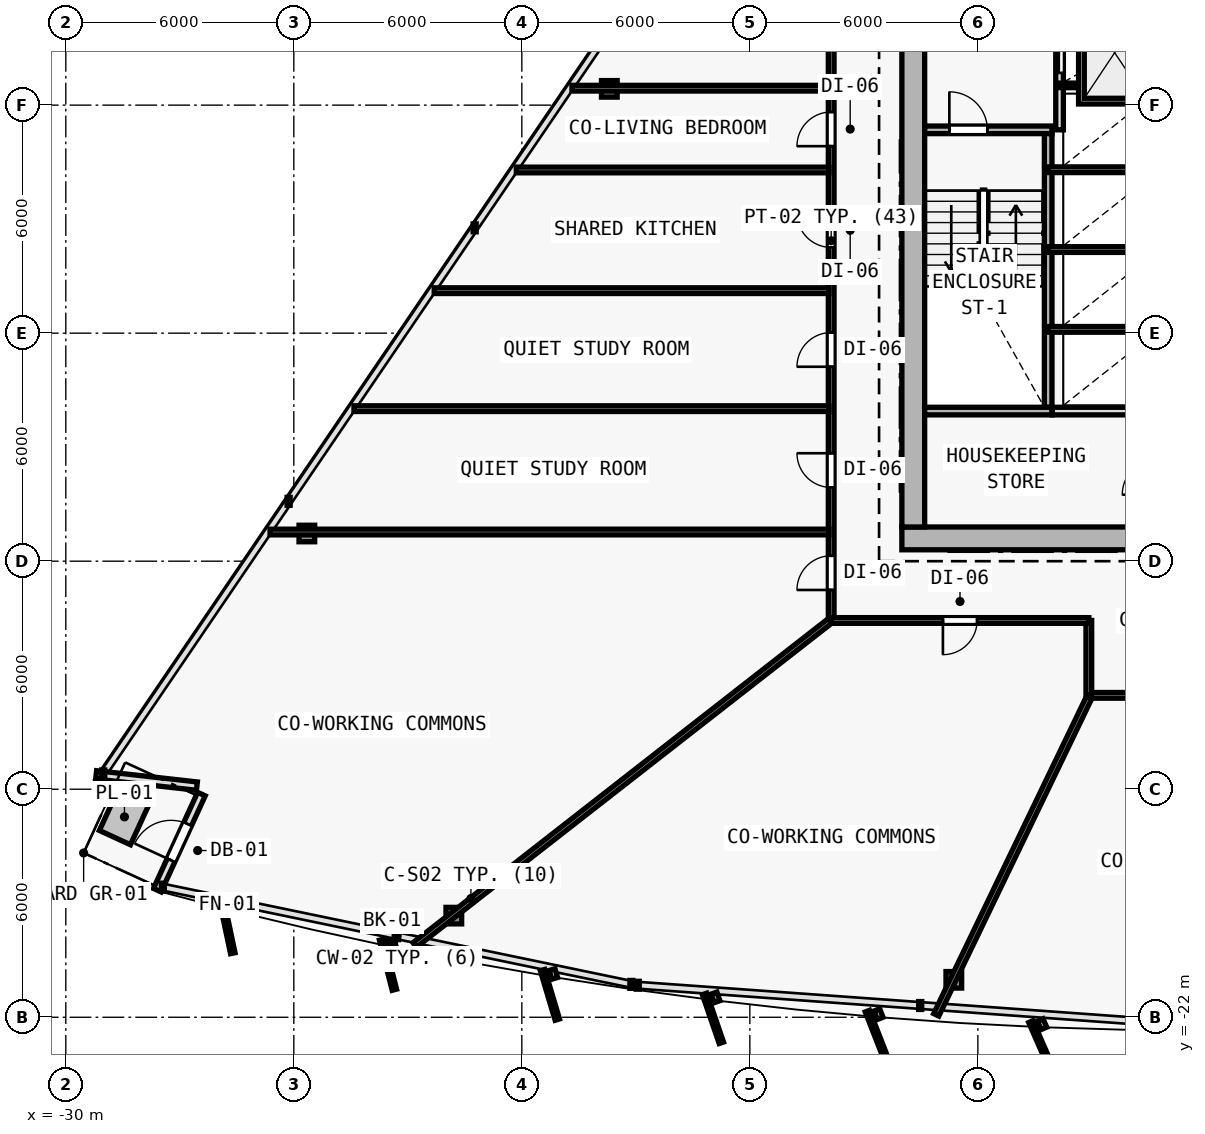
"""IFC4 building model, lengths in metres.
Left out: names, types, materials, properties, quantities, classifications, styles, units other than length and angle.
Written with IfcOpenShell. Run it as: python <this file> out.ifc"""

import sys

from ifc_helpers import new_model, si_unit, direction, frame, frame_2d, origin, origin_2d, place, context, subcontext, project, spatial, rectangle, i_section, extrude, element, fill, save


model = new_model("IFC4")
c1 = context("Model", 3, precision=1e-05, world=origin(), true_north=direction((0.0, 1.0)))
c2 = subcontext(c1, "Body", "Model", "MODEL_VIEW")
j1 = project(units=[si_unit("LENGTHUNIT", "METRE"), si_unit("PLANEANGLEUNIT", "RADIAN")], contexts=[c1])
p1 = place(None, origin())
s1 = spatial("IfcSite", under=j1, at=p1, CompositionType="ELEMENT")
p2 = place(p1, origin())
s2 = spatial("IfcBuilding", under=s1, at=p2, CompositionType="ELEMENT")
p3 = place(p2, frame((0.0, 0.0, 55.2)))
s3 = spatial("IfcBuildingStorey", under=s2, at=p3, CompositionType="ELEMENT", Elevation=55.2)
for number, where, z_axis, x_axis in (
    (1, (-7.7, -9.4, 0.0), (0.0, 0.0, 1.0), (1.0, 0.0, 0.0)),
    (2, (-7.7, 2.0, 0.0), (0.0, 0.0, 1.0), (1.0, 0.0, 0.0)),
):
    element("IfcColumn", number, at=place(p3, frame(where, z_axis=z_axis, x_axis=x_axis)), inside=s3, PredefinedType="COLUMN", context=c2, shape_type="SweptSolid", body=[
        extrude(i_section(OverallWidth=0.416, OverallDepth=0.446, WebThickness=0.025, FlangeThickness=0.04, FilletRadius=0.015, at=origin_2d()), origin(), (0.0, 0.0, 1.0), 3.6),
    ])
p4 = place(p3, frame((-19.79, -19.326, 0.006), z_axis=(0.020596292833, 0.033511459955, 0.999226087917), x_axis=(-0.851954850327, 0.523615252838, 0.0)))
e3 = element("IfcColumn", 3, at=p4, inside=s3, PredefinedType="COLUMN", context=c2, shape_type="SweptSolid", body=[
    extrude(i_section(OverallWidth=0.412, OverallDepth=0.435, WebThickness=0.023, FlangeThickness=0.037, FilletRadius=0.015, at=origin_2d()), origin(), (0.0, 0.0, 1.0), 3.592),
])
p5 = place(p3, frame((-6.633, -21.015, 0.006), z_axis=(0.006866308162, 0.0352833063, 0.999353762243), x_axis=(-0.981585848295, 0.191021523464, 0.0)))
e4 = element("IfcColumn", 4, at=p5, inside=s3, PredefinedType="COLUMN", context=c2, shape_type="SweptSolid", body=[
    extrude(i_section(OverallWidth=0.412, OverallDepth=0.435, WebThickness=0.023, FlangeThickness=0.037, FilletRadius=0.015, at=origin_2d()), origin(), (0.0, 0.0, 1.0), 3.591),
])
p6 = place(p3, frame((-15.698, 2.429, 0.006), z_axis=(0.017003572908, 0.009522000828, 0.999810086971), x_axis=(-0.488603368932, 0.87250601595, 0.0)))
e5 = element("IfcColumn", 5, at=p6, inside=s3, PredefinedType="COLUMN", context=c2, shape_type="SweptSolid", body=[
    extrude(i_section(OverallWidth=0.412, OverallDepth=0.435, WebThickness=0.023, FlangeThickness=0.037, FilletRadius=0.015, at=origin_2d()), origin(), (0.0, 0.0, 1.0), 3.59),
])
p7 = place(p3, frame((-23.657, -9.271, 0.006), z_axis=(0.025224163578, 0.021620711639, 0.999447990843), x_axis=(-0.650791373456, 0.759256602365, 0.0)))
e6 = element("IfcColumn", 6, at=p7, inside=s3, PredefinedType="COLUMN", context=c2, shape_type="SweptSolid", body=[
    extrude(i_section(OverallWidth=0.412, OverallDepth=0.435, WebThickness=0.023, FlangeThickness=0.037, FilletRadius=0.015, at=origin_2d()), origin(), (0.0, 0.0, 1.0), 3.591),
])
p8 = place(p3, frame((-26.55, -15.918, 0.0), z_axis=(0.0, 0.0, 1.0), x_axis=(-0.993824465748, 0.110963648468, 0.0)))
e7 = element("IfcWall", 7, at=p8, inside=s3, PredefinedType="SOLIDWALL", context=c2, shape_type="SweptSolid", body=[
    extrude(rectangle(XDim=2.669, YDim=0.22, at=frame_2d((1.334, 0.0))), origin(), (0.0, 0.0, 1.0), 3.35),
])
p9 = place(p3, frame((-27.593, -18.656, 0.0), z_axis=(0.0, 0.0, 1.0), x_axis=(0.417515840695, 0.908669644463, 0.0)))
e8 = element("IfcWall", 8, at=p9, inside=s3, PredefinedType="SOLIDWALL", context=c2, shape_type="SweptSolid", body=[
    extrude(rectangle(XDim=2.782, YDim=0.22, at=frame_2d((1.391, 0.0))), origin(), (0.0, 0.0, 1.0), 3.35),
])
p10 = place(p9, frame((0.866, 0.0, 0.0)))
e9 = element("IfcOpeningElement", 9, at=p10, cuts=e8, PredefinedType="OPENING", context=c2, shape_type="SweptSolid", body=[
    extrude(rectangle(XDim=1.05, YDim=2.15, at=frame_2d((0.525, 1.075))), frame((0.0, 0.12, 0.0), z_axis=(0.0, -1.0, 0.0), x_axis=(1.0, 0.0, 0.0)), (0.0, 0.0, 1.0), 0.24),
])
p11 = place(p3, frame((-8.0, -9.4, 0.0), z_axis=(0.0, 0.0, 1.0), x_axis=(1.0, 0.0, 0.0)))
e10 = element("IfcWall", 10, at=p11, inside=s3, PredefinedType="SHEAR", context=c2, shape_type="SweptSolid", body=[
    extrude(rectangle(XDim=16.0, YDim=0.6, at=frame_2d((8.0, 0.0))), origin(), (0.0, 0.0, 1.0), 3.35),
])
p12 = place(p11, frame((9.65, 0.0, 0.0)))
e11 = element("IfcOpeningElement", 11, at=p12, cuts=e10, PredefinedType="OPENING", context=c2, shape_type="SweptSolid", body=[
    extrude(rectangle(XDim=1.5, YDim=2.2, at=frame_2d((0.75, 1.1))), frame((0.0, 0.31, 0.0), z_axis=(0.0, -1.0, 0.0), x_axis=(1.0, 0.0, 0.0)), (0.0, 0.0, 1.0), 0.62),
])
p13 = place(p3, frame((-7.7, -9.1, 0.0), z_axis=(0.0, 0.0, 1.0), x_axis=(0.0, 1.0, 0.0)))
e12 = element("IfcWall", 12, at=p13, inside=s3, PredefinedType="SHEAR", context=c2, shape_type="SweptSolid", body=[
    extrude(rectangle(XDim=19.0, YDim=0.6, at=frame_2d((9.5, 0.0))), origin(), (0.0, 0.0, 1.0), 3.35),
])
p14 = place(p13, frame((12.65, 0.0, 0.0)))
e13 = element("IfcOpeningElement", 13, at=p14, cuts=e12, PredefinedType="OPENING", context=c2, shape_type="SweptSolid", body=[
    extrude(rectangle(XDim=1.1, YDim=2.15, at=frame_2d((0.55, 1.075))), frame((0.0, 0.31, 0.0), z_axis=(0.0, -1.0, 0.0), x_axis=(1.0, 0.0, 0.0)), (0.0, 0.0, 1.0), 0.62),
])
p15 = place(p3, frame((-7.4, 1.35, 0.0), z_axis=(0.0, 0.0, 1.0), x_axis=(1.0, 0.0, 0.0)))
e14 = element("IfcWall", 14, at=p15, inside=s3, PredefinedType="SOLIDWALL", context=c2, shape_type="SweptSolid", body=[
    extrude(rectangle(XDim=3.35, YDim=0.2, at=frame_2d((1.675, 0.0))), origin(), (0.0, 0.0, 1.0), 3.35),
])
p16 = place(p15, frame((0.65, 0.0, 0.0)))
e15 = element("IfcOpeningElement", 15, at=p16, cuts=e14, PredefinedType="OPENING", context=c2, shape_type="SweptSolid", body=[
    extrude(rectangle(XDim=1.0, YDim=2.15, at=frame_2d((0.5, 1.075))), frame((0.0, 0.11, 0.0), z_axis=(0.0, -1.0, 0.0), x_axis=(1.0, 0.0, 0.0)), (0.0, 0.0, 1.0), 0.22),
])
p17 = place(p3, frame((-4.15, -5.95, 0.0), z_axis=(0.0, 0.0, 1.0), x_axis=(0.0, 1.0, 0.0)))
e16 = element("IfcWall", 16, at=p17, inside=s3, PredefinedType="SOLIDWALL", context=c2, shape_type="SweptSolid", body=[
    extrude(rectangle(XDim=7.2, YDim=0.2, at=frame_2d((3.6, 0.0))), origin(), (0.0, 0.0, 1.0), 3.35),
])
p18 = place(p3, frame((-3.85, 1.35, 0.0), z_axis=(0.0, 0.0, 1.0), x_axis=(0.0, 1.0, 0.0)))
e17 = element("IfcWall", 17, at=p18, inside=s3, PredefinedType="SOLIDWALL", context=c2, shape_type="SweptSolid", body=[
    extrude(rectangle(XDim=8.545, YDim=0.2, at=frame_2d((4.272, 0.0))), origin(), (0.0, 0.0, 1.0), 3.35),
])
p19 = place(p18, frame((1.5, 0.0, 0.0)))
e18 = element("IfcOpeningElement", 18, at=p19, cuts=e17, PredefinedType="OPENING", context=c2, shape_type="SweptSolid", body=[
    extrude(rectangle(XDim=1.0, YDim=2.15, at=frame_2d((0.5, 1.075))), frame((0.0, 0.11, 0.0), z_axis=(0.0, -1.0, 0.0), x_axis=(1.0, 0.0, 0.0)), (0.0, 0.0, 1.0), 0.22),
])
p20 = place(p18, frame((3.18, 0.0, 0.0)))
e19 = element("IfcOpeningElement", 19, at=p20, cuts=e17, PredefinedType="OPENING", context=c2, shape_type="SweptSolid", body=[
    extrude(rectangle(XDim=1.0, YDim=2.15, at=frame_2d((0.5, 1.075))), frame((0.0, 0.11, 0.0), z_axis=(0.0, -1.0, 0.0), x_axis=(1.0, 0.0, 0.0)), (0.0, 0.0, 1.0), 0.22),
])
p21 = place(p3, frame((-3.85, 2.52, 0.0), z_axis=(0.0, 0.0, 1.0), x_axis=(1.0, 0.0, 0.0)))
e20 = element("IfcWall", 20, at=p21, inside=s3, PredefinedType="PARTITIONING", context=c2, shape_type="SweptSolid", body=[
    extrude(rectangle(XDim=2.9, YDim=0.12, at=frame_2d((1.45, 0.0))), origin(), (0.0, 0.0, 1.0), 3.35),
])
for number, where, z_axis, x_axis in (
    (21, (-4.15, -3.9, 0.0), (0.0, 0.0, 1.0), (1.0, 0.0, 0.0)),
    (22, (-4.15, -1.8, 0.0), (0.0, 0.0, 1.0), (1.0, 0.0, 0.0)),
    (23, (-4.15, 0.3, 0.0), (0.0, 0.0, 1.0), (1.0, 0.0, 0.0)),
):
    element("IfcWall", number, at=place(p3, frame(where, z_axis=z_axis, x_axis=x_axis)), inside=s3, PredefinedType="PARTITIONING", context=c2, shape_type="SweptSolid", body=[
        extrude(rectangle(XDim=2.9, YDim=0.15, at=frame_2d((1.45, 0.0))), origin(), (0.0, 0.0, 1.0), 3.35),
    ])
p22 = place(p3, frame((-7.4, -6.05, 0.0), z_axis=(0.0, 0.0, 1.0), x_axis=(1.0, 0.0, 0.0)))
e24 = element("IfcWall", 24, at=p22, inside=s3, PredefinedType="SOLIDWALL", context=c2, shape_type="SweptSolid", body=[
    extrude(rectangle(XDim=3.35, YDim=0.2, at=frame_2d((1.675, 0.0))), origin(), (0.0, 0.0, 1.0), 3.35),
])
p23 = place(p3, frame((-4.04, -6.05, 0.0), z_axis=(0.0, 0.0, 1.0), x_axis=(1.0, 0.0, 0.0)))
e25 = element("IfcWall", 25, at=p23, inside=s3, PredefinedType="SOLIDWALL", context=c2, shape_type="SweptSolid", body=[
    extrude(rectangle(XDim=2.79, YDim=0.2, at=frame_2d((1.395, 0.0))), origin(), (0.0, 0.0, 1.0), 3.35),
])
p24 = place(p3, frame((-9.86, -11.56, 0.0), z_axis=(0.0, 0.0, 1.0), x_axis=(0.0, 1.0, 0.0)))
e26 = element("IfcWall", 26, at=p24, inside=s3, PredefinedType="PARTITIONING", context=c2, shape_type="SweptSolid", body=[
    extrude(rectangle(XDim=19.986, YDim=0.15, at=frame_2d((9.993, 0.0))), origin(), (0.0, 0.0, 1.0), 2.609),
])
p25 = place(p24, frame((9.816, 0.0, 0.0)))
e27 = element("IfcOpeningElement", 27, at=p25, cuts=e26, PredefinedType="OPENING", context=c2, shape_type="SweptSolid", body=[
    extrude(rectangle(XDim=0.9, YDim=2.1, at=frame_2d((0.45, 1.05))), frame((0.0, 0.085, 0.0), z_axis=(0.0, -1.0, 0.0), x_axis=(1.0, 0.0, 0.0)), (0.0, 0.0, 1.0), 0.17),
])
p26 = place(p24, frame((6.676, 0.0, 0.0)))
e28 = element("IfcOpeningElement", 28, at=p26, cuts=e26, PredefinedType="OPENING", context=c2, shape_type="SweptSolid", body=[
    extrude(rectangle(XDim=0.9, YDim=2.1, at=frame_2d((0.45, 1.05))), frame((0.0, 0.085, 0.0), z_axis=(0.0, -1.0, 0.0), x_axis=(1.0, 0.0, 0.0)), (0.0, 0.0, 1.0), 0.17),
])
p27 = place(p24, frame((3.501, 0.0, 0.0)))
e29 = element("IfcOpeningElement", 29, at=p27, cuts=e26, PredefinedType="OPENING", context=c2, shape_type="SweptSolid", body=[
    extrude(rectangle(XDim=0.9, YDim=2.1, at=frame_2d((0.45, 1.05))), frame((0.0, 0.085, 0.0), z_axis=(0.0, -1.0, 0.0), x_axis=(1.0, 0.0, 0.0)), (0.0, 0.0, 1.0), 0.17),
])
p28 = place(p24, frame((0.803, 0.0, 0.0)))
e30 = element("IfcOpeningElement", 30, at=p28, cuts=e26, PredefinedType="OPENING", context=c2, shape_type="SweptSolid", body=[
    extrude(rectangle(XDim=0.9, YDim=2.1, at=frame_2d((0.45, 1.05))), frame((0.0, 0.085, 0.0), z_axis=(0.0, -1.0, 0.0), x_axis=(1.0, 0.0, 0.0)), (0.0, 0.0, 1.0), 0.17),
])
p29 = place(p24, frame((12.48, 0.0, 0.0)))
e31 = element("IfcOpeningElement", 31, at=p29, cuts=e26, PredefinedType="OPENING", context=c2, shape_type="SweptSolid", body=[
    extrude(rectangle(XDim=0.9, YDim=2.1, at=frame_2d((0.45, 1.05))), frame((0.0, 0.085, 0.0), z_axis=(0.0, -1.0, 0.0), x_axis=(1.0, 0.0, 0.0)), (0.0, 0.0, 1.0), 0.17),
])
p30 = place(p3, frame((3.08, -13.53, 0.0), z_axis=(0.0, 0.0, 1.0), x_axis=(-1.0, 0.0, 0.0)))
e32 = element("IfcWall", 32, at=p30, inside=s3, PredefinedType="PARTITIONING", context=c2, shape_type="SweptSolid", body=[
    extrude(rectangle(XDim=6.16, YDim=0.15, at=frame_2d((3.08, 0.0))), origin(), (0.0, 0.0, 1.0), 2.725),
])
p31 = place(p3, frame((-3.08, -13.53, 0.0), z_axis=(0.0, 0.0, 1.0), x_axis=(0.0, 1.0, 0.0)))
e33 = element("IfcWall", 33, at=p31, inside=s3, PredefinedType="PARTITIONING", context=c2, shape_type="SweptSolid", body=[
    extrude(rectangle(XDim=1.97, YDim=0.15, at=frame_2d((0.985, 0.0))), origin(), (0.0, 0.0, 1.0), 3.025),
])
p32 = place(p3, frame((-3.08, -11.56, 0.0), z_axis=(0.0, 0.0, 1.0), x_axis=(-1.0, 0.0, 0.0)))
e34 = element("IfcWall", 34, at=p32, inside=s3, PredefinedType="PARTITIONING", context=c2, shape_type="SweptSolid", body=[
    extrude(rectangle(XDim=6.78, YDim=0.15, at=frame_2d((3.39, 0.0))), origin(), (0.0, 0.0, 1.0), 3.35),
])
p33 = place(p32, frame((2.94, 0.0, 0.0)))
e35 = element("IfcOpeningElement", 35, at=p33, cuts=e34, PredefinedType="OPENING", context=c2, shape_type="SweptSolid", body=[
    extrude(rectangle(XDim=0.9, YDim=2.1, at=frame_2d((0.45, 1.05))), frame((0.0, 0.085, 0.0), z_axis=(0.0, -1.0, 0.0), x_axis=(1.0, 0.0, 0.0)), (0.0, 0.0, 1.0), 0.17),
])
p34 = place(p3, frame((-9.888, -11.569, 0.0), z_axis=(0.0, 0.0, 1.0), x_axis=(-0.788406815877, -0.615154202358, 0.0)))
e36 = element("IfcWall", 36, at=p34, inside=s3, PredefinedType="PARTITIONING", context=c2, shape_type="SweptSolid", body=[
    extrude(rectangle(XDim=13.863, YDim=0.15, at=frame_2d((6.932, 0.0))), origin(), (0.0, 0.0, 1.0), 2.725),
])
p35 = place(p3, frame((-3.066, -13.573, 0.0), z_axis=(0.0, 0.0, 1.0), x_axis=(-0.43397297164, -0.90092589034, 0.0)))
e37 = element("IfcWall", 37, at=p35, inside=s3, PredefinedType="PARTITIONING", context=c2, shape_type="SweptSolid", body=[
    extrude(rectangle(XDim=9.283, YDim=0.15, at=frame_2d((4.642, 0.0))), origin(), (0.0, 0.0, 1.0), 2.725),
])
p36 = place(p3, frame((-9.92, 2.446, 0.0), z_axis=(0.0, 0.0, 1.0), x_axis=(-1.0, 0.0, 0.0)))
e38 = element("IfcWall", 38, at=p36, inside=s3, PredefinedType="PARTITIONING", context=c2, shape_type="SweptSolid", body=[
    extrude(rectangle(XDim=6.761, YDim=0.15, at=frame_2d((3.381, 0.0))), origin(), (0.0, 0.0, 1.0), 2.725),
])
p37 = place(p3, frame((-9.92, -9.232, 0.0), z_axis=(0.0, 0.0, 1.0), x_axis=(-1.0, 0.0, 0.0)))
e39 = element("IfcWall", 39, at=p37, inside=s3, PredefinedType="PARTITIONING", context=c2, shape_type="SweptSolid", body=[
    extrude(rectangle(XDim=14.706, YDim=0.15, at=frame_2d((7.353, 0.0))), origin(), (0.0, 0.0, 1.0), 2.609),
])
p38 = place(p3, frame((-9.92, -2.882, 0.0), z_axis=(0.0, 0.0, 1.0), x_axis=(-1.0, 0.0, 0.0)))
e40 = element("IfcWall", 40, at=p38, inside=s3, PredefinedType="PARTITIONING", context=c2, shape_type="SweptSolid", body=[
    extrude(rectangle(XDim=10.385, YDim=0.15, at=frame_2d((5.193, 0.0))), origin(), (0.0, 0.0, 1.0), 2.735),
])
p39 = place(p3, frame((-9.92, 0.294, 0.0), z_axis=(0.0, 0.0, 1.0), x_axis=(-1.0, 0.0, 0.0)))
e41 = element("IfcWall", 41, at=p39, inside=s3, PredefinedType="PARTITIONING", context=c2, shape_type="SweptSolid", body=[
    extrude(rectangle(XDim=8.225, YDim=0.15, at=frame_2d((4.113, 0.0))), origin(), (0.0, 0.0, 1.0), 2.735),
])
p40 = place(p3, frame((-9.92, -5.986, 0.0), z_axis=(0.0, 0.0, 1.0), x_axis=(-1.0, 0.0, 0.0)))
e42 = element("IfcWall", 42, at=p40, inside=s3, PredefinedType="PARTITIONING", context=c2, shape_type="SweptSolid", body=[
    extrude(rectangle(XDim=12.497, YDim=0.15, at=frame_2d((6.249, 0.0))), origin(), (0.0, 0.0, 1.0), 2.735),
])
p41 = place(p10, origin())
e43 = element("IfcDoor", 43, at=p41, inside=s3, OperationType="SINGLE_SWING_LEFT", PredefinedType="DOOR", context=c2, shape_type="SweptSolid", body=[
    extrude(rectangle(XDim=1.05, YDim=2.15, at=frame_2d((0.525, 1.075))), frame((0.0, 0.025, 0.0), z_axis=(0.0, -1.0, 0.0), x_axis=(1.0, 0.0, 0.0)), (0.0, 0.0, 1.0), 0.05),
])
fill(e9, e43)
p42 = place(p16, origin())
e44 = element("IfcDoor", 44, at=p42, inside=s3, OperationType="SINGLE_SWING_LEFT", PredefinedType="DOOR", context=c2, shape_type="SweptSolid", body=[
    extrude(rectangle(XDim=1.0, YDim=2.15, at=frame_2d((0.5, 1.075))), frame((0.0, 0.025, 0.0), z_axis=(0.0, -1.0, 0.0), x_axis=(1.0, 0.0, 0.0)), (0.0, 0.0, 1.0), 0.05),
])
fill(e15, e44)
p43 = place(p19, origin())
e45 = element("IfcDoor", 45, at=p43, inside=s3, OperationType="DOUBLE_DOOR_SLIDING", PredefinedType="DOOR", context=c2, shape_type="SweptSolid", body=[
    extrude(rectangle(XDim=1.0, YDim=2.15, at=frame_2d((0.5, 1.075))), frame((0.0, 0.025, 0.0), z_axis=(0.0, -1.0, 0.0), x_axis=(1.0, 0.0, 0.0)), (0.0, 0.0, 1.0), 0.05),
])
fill(e18, e45)
p44 = place(p25, origin())
e46 = element("IfcDoor", 46, at=p44, inside=s3, OperationType="SINGLE_SWING_RIGHT", PredefinedType="DOOR", context=c2, shape_type="SweptSolid", body=[
    extrude(rectangle(XDim=0.9, YDim=2.1, at=frame_2d((0.45, 1.05))), frame((0.0, 0.025, 0.0), z_axis=(0.0, -1.0, 0.0), x_axis=(1.0, 0.0, 0.0)), (0.0, 0.0, 1.0), 0.05),
])
fill(e27, e46)
p45 = place(p26, origin())
e47 = element("IfcDoor", 47, at=p45, inside=s3, OperationType="SINGLE_SWING_LEFT", PredefinedType="DOOR", context=c2, shape_type="SweptSolid", body=[
    extrude(rectangle(XDim=0.9, YDim=2.1, at=frame_2d((0.45, 1.05))), frame((0.0, 0.025, 0.0), z_axis=(0.0, -1.0, 0.0), x_axis=(1.0, 0.0, 0.0)), (0.0, 0.0, 1.0), 0.05),
])
fill(e28, e47)
p46 = place(p27, origin())
e48 = element("IfcDoor", 48, at=p46, inside=s3, OperationType="SINGLE_SWING_RIGHT", PredefinedType="DOOR", context=c2, shape_type="SweptSolid", body=[
    extrude(rectangle(XDim=0.9, YDim=2.1, at=frame_2d((0.45, 1.05))), frame((0.0, 0.025, 0.0), z_axis=(0.0, -1.0, 0.0), x_axis=(1.0, 0.0, 0.0)), (0.0, 0.0, 1.0), 0.05),
])
fill(e29, e48)
p47 = place(p28, origin())
e49 = element("IfcDoor", 49, at=p47, inside=s3, OperationType="SINGLE_SWING_LEFT", PredefinedType="DOOR", context=c2, shape_type="SweptSolid", body=[
    extrude(rectangle(XDim=0.9, YDim=2.1, at=frame_2d((0.45, 1.05))), frame((0.0, 0.025, 0.0), z_axis=(0.0, -1.0, 0.0), x_axis=(1.0, 0.0, 0.0)), (0.0, 0.0, 1.0), 0.05),
])
fill(e30, e49)
p48 = place(p33, origin())
e50 = element("IfcDoor", 50, at=p48, inside=s3, OperationType="SINGLE_SWING_RIGHT", PredefinedType="DOOR", context=c2, shape_type="SweptSolid", body=[
    extrude(rectangle(XDim=0.9, YDim=2.1, at=frame_2d((0.45, 1.05))), frame((0.0, 0.025, 0.0), z_axis=(0.0, -1.0, 0.0), x_axis=(1.0, 0.0, 0.0)), (0.0, 0.0, 1.0), 0.05),
])
fill(e35, e50)
p49 = place(p29, origin())
e51 = element("IfcDoor", 51, at=p49, inside=s3, OperationType="SINGLE_SWING_LEFT", PredefinedType="DOOR", context=c2, shape_type="SweptSolid", body=[
    extrude(rectangle(XDim=0.9, YDim=2.1, at=frame_2d((0.45, 1.05))), frame((0.0, 0.025, 0.0), z_axis=(0.0, -1.0, 0.0), x_axis=(1.0, 0.0, 0.0)), (0.0, 0.0, 1.0), 0.05),
])
fill(e31, e51)
save(model, sys.argv[1])
